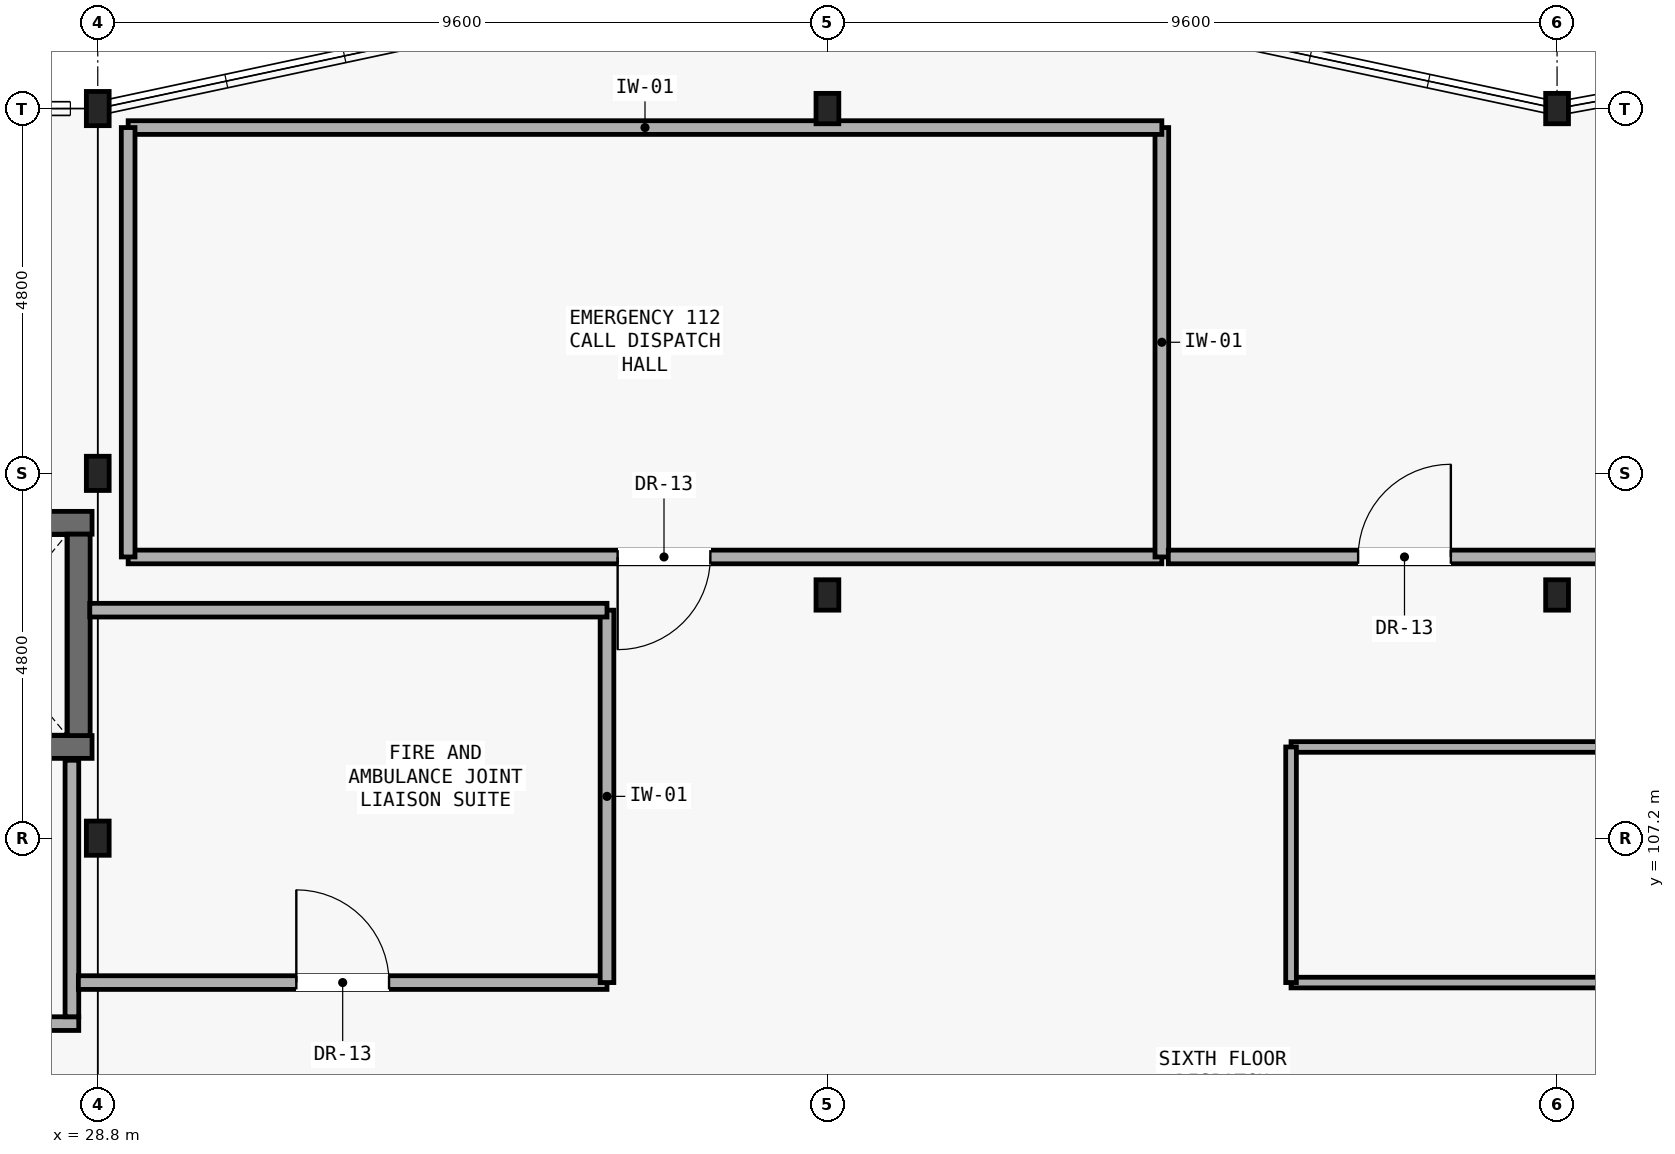
"""IFC4 building model, lengths in metres.
Left out: names, types, materials, properties, quantities, classifications, styles, units other than length and angle.
Written with IfcOpenShell. Run it as: python <this file> out.ifc"""

import sys

from ifc_helpers import new_model, si_unit, direction, frame, frame_2d, origin, origin_2d, place, context, subcontext, project, spatial, rectangle, i_section, extrude, element, fill, save


model = new_model("IFC4")
c1 = context("Model", 3, precision=1e-05, world=origin(), true_north=direction((0.0, 1.0)))
c2 = subcontext(c1, "Body", "Model", "MODEL_VIEW")
j1 = project(units=[si_unit("LENGTHUNIT", "METRE"), si_unit("PLANEANGLEUNIT", "RADIAN")], contexts=[c1])
p1 = place(None, origin())
s1 = spatial("IfcSite", under=j1, at=p1, CompositionType="ELEMENT")
p2 = place(p1, origin())
s2 = spatial("IfcBuilding", under=s1, at=p2, CompositionType="ELEMENT")
p3 = place(p2, frame((0.0, 0.0, 26.25)))
s3 = spatial("IfcBuildingStorey", under=s2, at=p3, CompositionType="ELEMENT", Elevation=26.25)
for number, where, z_axis, x_axis in (
    (1, (28.8, 107.2, 0.0), (0.0, 0.0, 1.0), (1.0, 0.0, 0.0)),
    (2, (28.8, 112.0, 0.0), (0.0, 0.0, 1.0), (1.0, 0.0, 0.0)),
    (3, (28.8, 116.8, 0.0), (0.0, 0.0, 1.0), (1.0, 0.0, 0.0)),
):
    element("IfcColumn", number, at=place(p3, frame(where, z_axis=z_axis, x_axis=x_axis)), inside=s3, PredefinedType="COLUMN", context=c2, shape_type="SweptSolid", body=[
        extrude(i_section(OverallWidth=0.3, OverallDepth=0.45, WebThickness=0.014, FlangeThickness=0.026, FilletRadius=0.027, at=origin_2d()), origin(), (0.0, 0.0, 1.0), 4.9),
    ])
for number, where, z_axis, x_axis in (
    (4, (38.4, 110.4, 0.0), (0.0, 0.0, 1.0), (1.0, 0.0, 0.0)),
    (5, (38.4, 116.8, 0.0), (0.0, 0.0, 1.0), (1.0, 0.0, 0.0)),
    (6, (48.0, 110.4, 0.0), (0.0, 0.0, 1.0), (1.0, 0.0, 0.0)),
    (7, (48.0, 116.8, 0.0), (0.0, 0.0, 1.0), (1.0, 0.0, 0.0)),
):
    element("IfcColumn", number, at=place(p3, frame(where, z_axis=z_axis, x_axis=x_axis)), inside=s3, PredefinedType="COLUMN", context=c2, shape_type="SweptSolid", body=[
        extrude(i_section(OverallWidth=0.3, OverallDepth=0.4, WebThickness=0.013, FlangeThickness=0.024, FilletRadius=0.027, at=origin_2d()), origin(), (0.0, 0.0, 1.0), 4.9),
    ])
p4 = place(p3, frame((26.225, 108.4, 0.0), z_axis=(0.0, 0.0, 1.0), x_axis=(1.0, 0.0, 0.0)))
e8 = element("IfcWall", 8, at=p4, inside=s3, PredefinedType="SHEAR", context=c2, shape_type="SweptSolid", body=[
    extrude(rectangle(XDim=2.5, YDim=0.3, at=frame_2d((1.25, 0.0))), origin(), (0.0, 0.0, 1.0), 4.71),
])
p5 = place(p4, frame((0.7, 0.0, 0.0)))
e9 = element("IfcOpeningElement", 9, at=p5, cuts=e8, PredefinedType="OPENING", context=c2, shape_type="SweptSolid", body=[
    extrude(rectangle(XDim=1.1, YDim=2.1, at=frame_2d((0.55, 1.05))), frame((0.0, 0.16, 0.0), z_axis=(0.0, -1.0, 0.0), x_axis=(1.0, 0.0, 0.0)), (0.0, 0.0, 1.0), 0.32),
])
p6 = place(p3, frame((26.225, 111.35, 0.0), z_axis=(0.0, 0.0, 1.0), x_axis=(1.0, 0.0, 0.0)))
e10 = element("IfcWall", 10, at=p6, inside=s3, PredefinedType="SHEAR", context=c2, shape_type="SweptSolid", body=[
    extrude(rectangle(XDim=2.5, YDim=0.3, at=frame_2d((1.25, 0.0))), origin(), (0.0, 0.0, 1.0), 4.71),
])
p7 = place(p3, frame((28.55, 108.55, 0.0), z_axis=(0.0, 0.0, 1.0), x_axis=(0.0, 1.0, 0.0)))
e11 = element("IfcWall", 11, at=p7, inside=s3, PredefinedType="SHEAR", context=c2, shape_type="SweptSolid", body=[
    extrude(rectangle(XDim=2.65, YDim=0.3, at=frame_2d((1.325, 0.0))), origin(), (0.0, 0.0, 1.0), 4.71),
])
p8 = place(p3, frame((20.0, 104.76, 0.0), z_axis=(0.0, 0.0, 1.0), x_axis=(1.0, 0.0, 0.0)))
e12 = element("IfcWall", 12, at=p8, inside=s3, PredefinedType="PARTITIONING", context=c2, shape_type="SweptSolid", body=[
    extrude(rectangle(XDim=8.55, YDim=0.18, at=frame_2d((4.275, 0.0))), origin(), (0.0, 0.0, 1.0), 4.19),
])
p9 = place(p3, frame((28.46, 104.85, 0.0), z_axis=(0.0, 0.0, 1.0), x_axis=(0.0, 1.0, 0.0)))
e13 = element("IfcWall", 13, at=p9, inside=s3, PredefinedType="PARTITIONING", context=c2, shape_type="SweptSolid", body=[
    extrude(rectangle(XDim=3.375, YDim=0.18, at=frame_2d((1.688, 0.0))), origin(), (0.0, 0.0, 1.0), 4.71),
])
p10 = place(p3, frame((29.2, 110.9, 0.0), z_axis=(0.0, 0.0, 1.0), x_axis=(1.0, 0.0, 0.0)))
e14 = element("IfcWall", 14, at=p10, inside=s3, PredefinedType="PARTITIONING", context=c2, shape_type="SweptSolid", body=[
    extrude(rectangle(XDim=13.6, YDim=0.18, at=frame_2d((6.8, 0.0))), origin(), (0.0, 0.0, 1.0), 4.71),
])
p11 = place(p10, frame((6.44, 0.0, 0.0)))
e15 = element("IfcOpeningElement", 15, at=p11, cuts=e14, PredefinedType="OPENING", context=c2, shape_type="SweptSolid", body=[
    extrude(rectangle(XDim=1.22, YDim=2.1, at=frame_2d((0.61, 1.05))), frame((0.0, 0.1, 0.0), z_axis=(0.0, -1.0, 0.0), x_axis=(1.0, 0.0, 0.0)), (0.0, 0.0, 1.0), 0.2),
])
p12 = place(p3, frame((42.8, 110.9, 0.0), z_axis=(0.0, 0.0, 1.0), x_axis=(0.0, 1.0, 0.0)))
e16 = element("IfcWall", 16, at=p12, inside=s3, PredefinedType="PARTITIONING", context=c2, shape_type="SweptSolid", body=[
    extrude(rectangle(XDim=5.65, YDim=0.18, at=frame_2d((2.825, 0.0))), origin(), (0.0, 0.0, 1.0), 4.71),
])
p13 = place(p3, frame((42.8, 116.55, 0.0), z_axis=(0.0, 0.0, 1.0), x_axis=(-1.0, 0.0, 0.0)))
e17 = element("IfcWall", 17, at=p13, inside=s3, PredefinedType="PARTITIONING", context=c2, shape_type="SweptSolid", body=[
    extrude(rectangle(XDim=13.6, YDim=0.18, at=frame_2d((6.8, 0.0))), origin(), (0.0, 0.0, 1.0), 4.335),
])
p14 = place(p3, frame((29.2, 116.55, 0.0), z_axis=(0.0, 0.0, 1.0), x_axis=(0.0, -1.0, 0.0)))
e18 = element("IfcWall", 18, at=p14, inside=s3, PredefinedType="PARTITIONING", context=c2, shape_type="SweptSolid", body=[
    extrude(rectangle(XDim=5.65, YDim=0.18, at=frame_2d((2.825, 0.0))), origin(), (0.0, 0.0, 1.0), 4.71),
])
p15 = place(p3, frame((42.885, 110.9, 0.0), z_axis=(0.0, 0.0, 1.0), x_axis=(1.0, 0.0, 0.0)))
e19 = element("IfcWall", 19, at=p15, inside=s3, PredefinedType="PARTITIONING", context=c2, shape_type="SweptSolid", body=[
    extrude(rectangle(XDim=14.715, YDim=0.18, at=frame_2d((7.357, 0.0))), origin(), (0.0, 0.0, 1.0), 4.71),
])
p16 = place(p15, frame((2.498, 0.0, 0.0)))
e20 = element("IfcOpeningElement", 20, at=p16, cuts=e19, PredefinedType="OPENING", context=c2, shape_type="SweptSolid", body=[
    extrude(rectangle(XDim=1.22, YDim=2.1, at=frame_2d((0.61, 1.05))), frame((0.0, 0.1, 0.0), z_axis=(0.0, -1.0, 0.0), x_axis=(1.0, 0.0, 0.0)), (0.0, 0.0, 1.0), 0.2),
])
p17 = place(p3, frame((28.545, 105.3, 0.0), z_axis=(0.0, 0.0, 1.0), x_axis=(1.0, 0.0, 0.0)))
e21 = element("IfcWall", 21, at=p17, inside=s3, PredefinedType="PARTITIONING", context=c2, shape_type="SweptSolid", body=[
    extrude(rectangle(XDim=6.955, YDim=0.18, at=frame_2d((3.478, 0.0))), origin(), (0.0, 0.0, 1.0), 4.285),
])
p18 = place(p17, frame((2.867, 0.0, 0.0)))
e22 = element("IfcOpeningElement", 22, at=p18, cuts=e21, PredefinedType="OPENING", context=c2, shape_type="SweptSolid", body=[
    extrude(rectangle(XDim=1.22, YDim=2.1, at=frame_2d((0.61, 1.05))), frame((0.0, 0.1, 0.0), z_axis=(0.0, -1.0, 0.0), x_axis=(1.0, 0.0, 0.0)), (0.0, 0.0, 1.0), 0.2),
])
p19 = place(p3, frame((35.5, 105.3, 0.0), z_axis=(0.0, 0.0, 1.0), x_axis=(0.0, 1.0, 0.0)))
e23 = element("IfcWall", 23, at=p19, inside=s3, PredefinedType="PARTITIONING", context=c2, shape_type="SweptSolid", body=[
    extrude(rectangle(XDim=4.9, YDim=0.18, at=frame_2d((2.45, 0.0))), origin(), (0.0, 0.0, 1.0), 4.71),
])
p20 = place(p3, frame((35.5, 110.2, 0.0), z_axis=(0.0, 0.0, 1.0), x_axis=(-1.0, 0.0, 0.0)))
e24 = element("IfcWall", 24, at=p20, inside=s3, PredefinedType="PARTITIONING", context=c2, shape_type="SweptSolid", body=[
    extrude(rectangle(XDim=6.805, YDim=0.18, at=frame_2d((3.402, 0.0))), origin(), (0.0, 0.0, 1.0), 4.105),
])
p21 = place(p3, frame((44.5, 105.3, 0.0), z_axis=(0.0, 0.0, 1.0), x_axis=(1.0, 0.0, 0.0)))
e25 = element("IfcWall", 25, at=p21, inside=s3, PredefinedType="PARTITIONING", context=c2, shape_type="SweptSolid", body=[
    extrude(rectangle(XDim=11.1, YDim=0.14, at=frame_2d((5.55, 0.0))), origin(), (0.0, 0.0, 1.0), 4.285),
])
p22 = place(p21, frame((5.04, 0.0, 0.0)))
e26 = element("IfcOpeningElement", 26, at=p22, cuts=e25, PredefinedType="OPENING", context=c2, shape_type="SweptSolid", body=[
    extrude(rectangle(XDim=1.02, YDim=2.1, at=frame_2d((0.51, 1.05))), frame((0.0, 0.08, 0.0), z_axis=(0.0, -1.0, 0.0), x_axis=(1.0, 0.0, 0.0)), (0.0, 0.0, 1.0), 0.16),
])
p23 = place(p3, frame((55.6, 108.4, 0.0), z_axis=(0.0, 0.0, 1.0), x_axis=(-1.0, 0.0, 0.0)))
e27 = element("IfcWall", 27, at=p23, inside=s3, PredefinedType="PARTITIONING", context=c2, shape_type="SweptSolid", body=[
    extrude(rectangle(XDim=11.1, YDim=0.14, at=frame_2d((5.55, 0.0))), origin(), (0.0, 0.0, 1.0), 4.71),
])
p24 = place(p3, frame((44.5, 108.4, 0.0), z_axis=(0.0, 0.0, 1.0), x_axis=(0.0, -1.0, 0.0)))
e28 = element("IfcWall", 28, at=p24, inside=s3, PredefinedType="PARTITIONING", context=c2, shape_type="SweptSolid", body=[
    extrude(rectangle(XDim=3.1, YDim=0.14, at=frame_2d((1.55, 0.0))), origin(), (0.0, 0.0, 1.0), 4.71),
])
p25 = place(p11, frame((1.22, 0.0, 0.0), z_axis=(0.0, 0.0, 1.0), x_axis=(-1.0, 0.0, 0.0)))
e29 = element("IfcDoor", 29, at=p25, inside=s3, OperationType="SINGLE_SWING_LEFT", PredefinedType="DOOR", context=c2, shape_type="SweptSolid", body=[
    extrude(rectangle(XDim=1.22, YDim=2.1, at=frame_2d((0.61, 1.05))), frame((0.0, 0.025, 0.0), z_axis=(0.0, -1.0, 0.0), x_axis=(1.0, 0.0, 0.0)), (0.0, 0.0, 1.0), 0.05),
])
fill(e15, e29)
p26 = place(p16, origin())
e30 = element("IfcDoor", 30, at=p26, inside=s3, OperationType="SINGLE_SWING_RIGHT", PredefinedType="DOOR", context=c2, shape_type="SweptSolid", body=[
    extrude(rectangle(XDim=1.22, YDim=2.1, at=frame_2d((0.61, 1.05))), frame((0.0, 0.025, 0.0), z_axis=(0.0, -1.0, 0.0), x_axis=(1.0, 0.0, 0.0)), (0.0, 0.0, 1.0), 0.05),
])
fill(e20, e30)
p27 = place(p18, origin())
e31 = element("IfcDoor", 31, at=p27, inside=s3, OperationType="SINGLE_SWING_LEFT", PredefinedType="DOOR", context=c2, shape_type="SweptSolid", body=[
    extrude(rectangle(XDim=1.22, YDim=2.1, at=frame_2d((0.61, 1.05))), frame((0.0, 0.025, 0.0), z_axis=(0.0, -1.0, 0.0), x_axis=(1.0, 0.0, 0.0)), (0.0, 0.0, 1.0), 0.05),
])
fill(e22, e31)
save(model, sys.argv[1])
